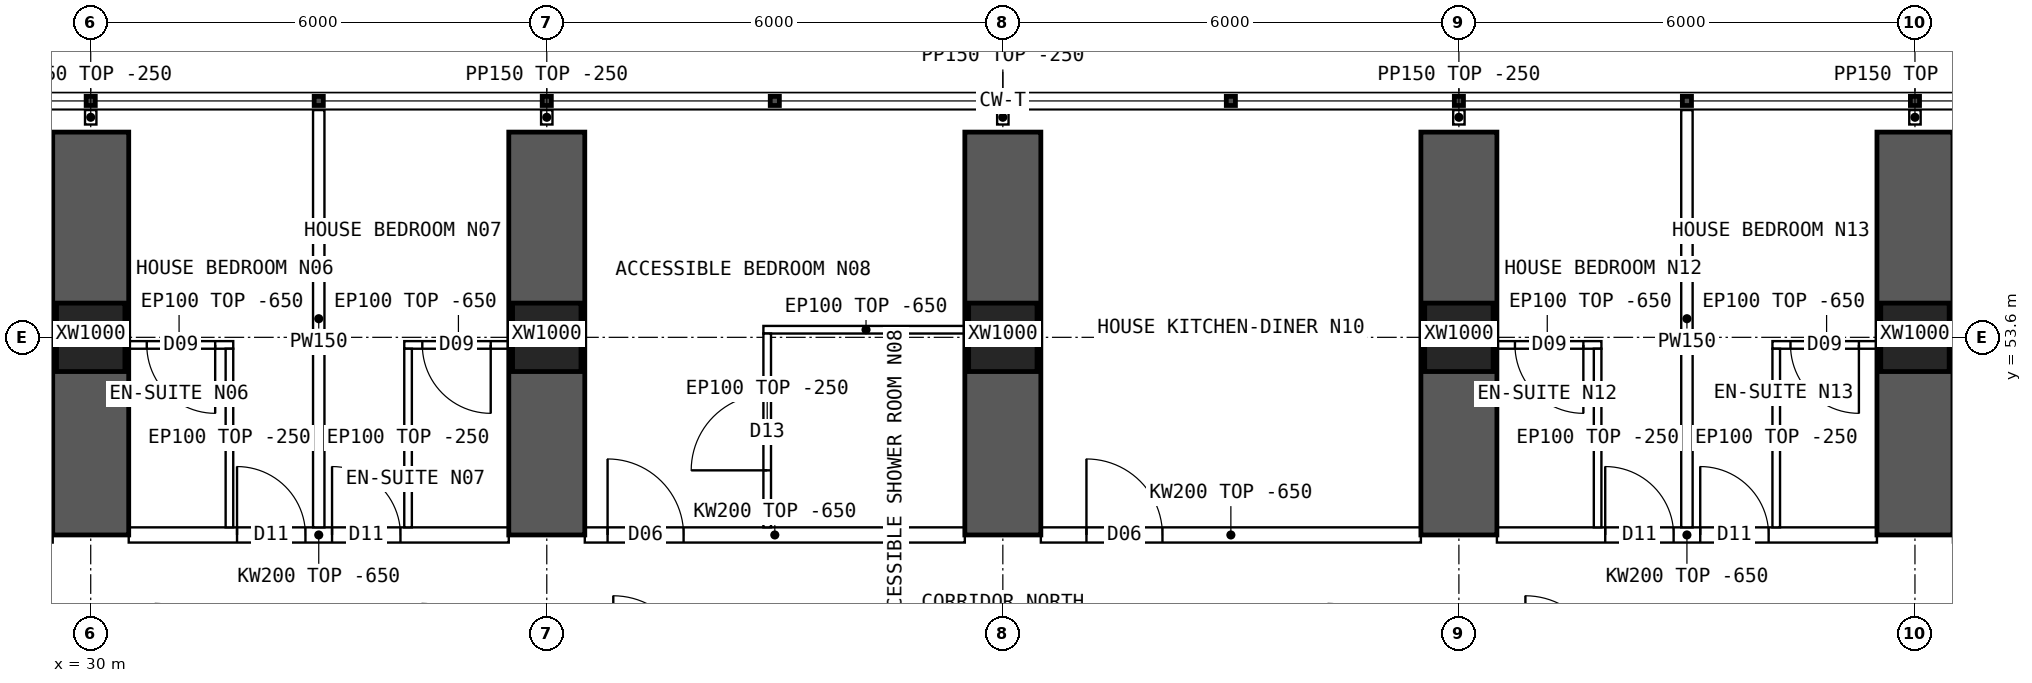
"""IFC4 building model, lengths in metres.
Left out: names, types, materials, properties, quantities, classifications, styles, units other than length and angle.
Written with IfcOpenShell. Run it as: python <this file> out.ifc"""

import sys

from ifc_helpers import new_model, si_unit, direction, frame, frame_2d, origin, origin_2d, place, context, subcontext, project, spatial, polyline, rectangle, hollow_rectangle, outline, extrude, element, fill, save


model = new_model("IFC4")
c1 = context("Model", 3, precision=1e-05, world=origin(), true_north=direction((0.0, 1.0)))
c2 = subcontext(c1, "Body", "Model", "MODEL_VIEW")
j1 = project(units=[si_unit("LENGTHUNIT", "METRE"), si_unit("PLANEANGLEUNIT", "RADIAN")], contexts=[c1])
p1 = place(None, origin())
s1 = spatial("IfcSite", under=j1, at=p1, CompositionType="ELEMENT")
p2 = place(p1, origin())
s2 = spatial("IfcBuilding", under=s1, at=p2, CompositionType="ELEMENT")
p3 = place(p2, frame((0.0, 0.0, 23.95)))
s3 = spatial("IfcBuildingStorey", under=s2, at=p3, CompositionType="ELEMENT", Elevation=23.95)
for number, where, z_axis, x_axis in (
    (1, (30.0, 53.6, 0.0), (0.0, 0.0, 1.0), (1.0, 0.0, 0.0)),
    (2, (36.0, 53.6, 0.0), (0.0, 0.0, 1.0), (1.0, 0.0, 0.0)),
    (3, (42.0, 53.6, 0.0), (0.0, 0.0, 1.0), (1.0, 0.0, 0.0)),
    (4, (48.0, 53.6, 0.0), (0.0, 0.0, 1.0), (1.0, 0.0, 0.0)),
    (5, (54.0, 53.6, 0.0), (0.0, 0.0, 1.0), (1.0, 0.0, 0.0)),
):
    element("IfcColumn", number, at=place(p3, frame(where, z_axis=z_axis, x_axis=x_axis)), inside=s3, PredefinedType="COLUMN", context=c2, shape_type="SweptSolid", body=[
        extrude(hollow_rectangle(XDim=0.9, YDim=0.9, WallThickness=0.09, at=origin_2d()), origin(), (0.0, 0.0, 1.0), 3.75),
    ])
for number, where, z_axis, x_axis in (
    (6, (30.0, 51.0, 0.0), (0.0, 0.0, 1.0), (0.0, 1.0, 0.0)),
    (7, (36.0, 51.0, 0.0), (0.0, 0.0, 1.0), (0.0, 1.0, 0.0)),
    (8, (42.0, 51.0, 0.0), (0.0, 0.0, 1.0), (0.0, 1.0, 0.0)),
    (9, (48.0, 51.0, 0.0), (0.0, 0.0, 1.0), (0.0, 1.0, 0.0)),
    (10, (54.0, 51.0, 0.0), (0.0, 0.0, 1.0), (0.0, 1.0, 0.0)),
):
    element("IfcWall", number, at=place(p3, frame(where, z_axis=z_axis, x_axis=x_axis)), inside=s3, PredefinedType="SHEAR", context=c2, shape_type="SweptSolid", body=[
        extrude(rectangle(XDim=5.3, YDim=1.0, at=frame_2d((2.65, 0.0))), origin(), (0.0, 0.0, 1.0), 3.75),
    ])
p4 = place(p3, frame((30.5, 51.0, 0.0), z_axis=(0.0, 0.0, 1.0), x_axis=(1.0, 0.0, 0.0)))
e11 = element("IfcWall", 11, at=p4, inside=s3, PredefinedType="SOLIDWALL", context=c2, shape_type="SweptSolid", body=[
    extrude(outline(polyline([(0.0, 0.0), (5.0, 0.0), (5.0, 3.1), (0.0, 3.1), (0.0, 0.0)])), frame((0.0, 0.1, 0.0), z_axis=(0.0, -1.0, 0.0), x_axis=(1.0, 0.0, 0.0)), (0.0, 0.0, 1.0), 0.2),
])
p5 = place(p4, frame((1.425, 0.0, 0.0)))
e12 = element("IfcOpeningElement", 12, at=p5, cuts=e11, PredefinedType="OPENING", context=c2, shape_type="SweptSolid", body=[
    extrude(rectangle(XDim=0.9, YDim=2.1, at=frame_2d((0.45, 1.05))), frame((0.0, 0.11, 0.0), z_axis=(0.0, -1.0, 0.0), x_axis=(1.0, 0.0, 0.0)), (0.0, 0.0, 1.0), 0.22),
])
p6 = place(p4, frame((2.675, 0.0, 0.0)))
e13 = element("IfcOpeningElement", 13, at=p6, cuts=e11, PredefinedType="OPENING", context=c2, shape_type="SweptSolid", body=[
    extrude(rectangle(XDim=0.9, YDim=2.1, at=frame_2d((0.45, 1.05))), frame((0.0, 0.11, 0.0), z_axis=(0.0, -1.0, 0.0), x_axis=(1.0, 0.0, 0.0)), (0.0, 0.0, 1.0), 0.22),
])
p7 = place(p3, frame((36.5, 51.0, 0.0), z_axis=(0.0, 0.0, 1.0), x_axis=(1.0, 0.0, 0.0)))
e14 = element("IfcWall", 14, at=p7, inside=s3, PredefinedType="SOLIDWALL", context=c2, shape_type="SweptSolid", body=[
    extrude(outline(polyline([(0.0, 0.0), (5.0, 0.0), (5.0, 3.1), (0.0, 3.1), (0.0, 0.0)])), frame((0.0, 0.1, 0.0), z_axis=(0.0, -1.0, 0.0), x_axis=(1.0, 0.0, 0.0)), (0.0, 0.0, 1.0), 0.2),
])
p8 = place(p7, frame((0.3, 0.0, 0.0)))
e15 = element("IfcOpeningElement", 15, at=p8, cuts=e14, PredefinedType="OPENING", context=c2, shape_type="SweptSolid", body=[
    extrude(rectangle(XDim=1.0, YDim=2.1, at=frame_2d((0.5, 1.05))), frame((0.0, 0.11, 0.0), z_axis=(0.0, -1.0, 0.0), x_axis=(1.0, 0.0, 0.0)), (0.0, 0.0, 1.0), 0.22),
])
p9 = place(p3, frame((42.5, 51.0, 0.0), z_axis=(0.0, 0.0, 1.0), x_axis=(1.0, 0.0, 0.0)))
e16 = element("IfcWall", 16, at=p9, inside=s3, PredefinedType="SOLIDWALL", context=c2, shape_type="SweptSolid", body=[
    extrude(outline(polyline([(0.0, 0.0), (5.0, 0.0), (5.0, 3.1), (0.0, 3.1), (0.0, 0.0)])), frame((0.0, 0.1, 0.0), z_axis=(0.0, -1.0, 0.0), x_axis=(1.0, 0.0, 0.0)), (0.0, 0.0, 1.0), 0.2),
])
p10 = place(p9, frame((0.6, 0.0, 0.0)))
e17 = element("IfcOpeningElement", 17, at=p10, cuts=e16, PredefinedType="OPENING", context=c2, shape_type="SweptSolid", body=[
    extrude(rectangle(XDim=1.0, YDim=2.1, at=frame_2d((0.5, 1.05))), frame((0.0, 0.11, 0.0), z_axis=(0.0, -1.0, 0.0), x_axis=(1.0, 0.0, 0.0)), (0.0, 0.0, 1.0), 0.22),
])
p11 = place(p3, frame((48.5, 51.0, 0.0), z_axis=(0.0, 0.0, 1.0), x_axis=(1.0, 0.0, 0.0)))
e18 = element("IfcWall", 18, at=p11, inside=s3, PredefinedType="SOLIDWALL", context=c2, shape_type="SweptSolid", body=[
    extrude(outline(polyline([(0.0, 0.0), (5.0, 0.0), (5.0, 3.1), (0.0, 3.1), (0.0, 0.0)])), frame((0.0, 0.1, 0.0), z_axis=(0.0, -1.0, 0.0), x_axis=(1.0, 0.0, 0.0)), (0.0, 0.0, 1.0), 0.2),
])
p12 = place(p11, frame((1.425, 0.0, 0.0)))
e19 = element("IfcOpeningElement", 19, at=p12, cuts=e18, PredefinedType="OPENING", context=c2, shape_type="SweptSolid", body=[
    extrude(rectangle(XDim=0.9, YDim=2.1, at=frame_2d((0.45, 1.05))), frame((0.0, 0.11, 0.0), z_axis=(0.0, -1.0, 0.0), x_axis=(1.0, 0.0, 0.0)), (0.0, 0.0, 1.0), 0.22),
])
p13 = place(p11, frame((2.675, 0.0, 0.0)))
e20 = element("IfcOpeningElement", 20, at=p13, cuts=e18, PredefinedType="OPENING", context=c2, shape_type="SweptSolid", body=[
    extrude(rectangle(XDim=0.9, YDim=2.1, at=frame_2d((0.45, 1.05))), frame((0.0, 0.11, 0.0), z_axis=(0.0, -1.0, 0.0), x_axis=(1.0, 0.0, 0.0)), (0.0, 0.0, 1.0), 0.22),
])
p14 = place(p3, frame((33.0, 56.59, 0.0), z_axis=(0.0, 0.0, 1.0), x_axis=(0.0, -1.0, 0.0)))
e21 = element("IfcWall", 21, at=p14, inside=s3, PredefinedType="PARTITIONING", context=c2, shape_type="SweptSolid", body=[
    extrude(outline(polyline([(0.0, 0.0), (5.49, 0.0), (5.49, 3.1), (5.442, 3.1), (5.44, 3.5), (3.192, 3.5), (3.19, 3.1), (2.792, 3.1), (2.79, 3.5), (0.0, 3.5), (0.0, 0.0)])), frame((0.0, 0.075, 0.0), z_axis=(0.0, -1.0, 0.0), x_axis=(1.0, 0.0, 0.0)), (0.0, 0.0, 1.0), 0.15),
])
p15 = place(p3, frame((30.45, 53.5, 0.0), z_axis=(0.0, 0.0, 1.0), x_axis=(1.0, 0.0, 0.0)))
e22 = element("IfcWall", 22, at=p15, inside=s3, PredefinedType="PARTITIONING", context=c2, shape_type="SweptSolid", body=[
    extrude(outline(polyline([(0.0, 0.0), (1.425, 0.0), (1.425, 3.1), (0.0, 3.1), (0.0, 0.0)])), frame((0.0, 0.05, 0.0), z_axis=(0.0, -1.0, 0.0), x_axis=(1.0, 0.0, 0.0)), (0.0, 0.0, 1.0), 0.1),
])
p16 = place(p15, frame((0.288, 0.0, 0.0)))
e23 = element("IfcOpeningElement", 23, at=p16, cuts=e22, PredefinedType="OPENING", context=c2, shape_type="SweptSolid", body=[
    extrude(rectangle(XDim=0.9, YDim=2.1, at=frame_2d((0.45, 1.05))), frame((0.0, 0.06, 0.0), z_axis=(0.0, -1.0, 0.0), x_axis=(1.0, 0.0, 0.0)), (0.0, 0.0, 1.0), 0.12),
])
p17 = place(p3, frame((31.825, 53.45, 0.0), z_axis=(0.0, 0.0, 1.0), x_axis=(0.0, -1.0, 0.0)))
e24 = element("IfcWall", 24, at=p17, inside=s3, PredefinedType="PARTITIONING", context=c2, shape_type="SweptSolid", body=[
    extrude(outline(polyline([(0.0, 0.0), (2.35, 0.0), (2.35, 3.1), (2.302, 3.1), (2.3, 3.5), (0.052, 3.5), (0.05, 3.1), (0.0, 3.1), (0.0, 0.0)])), frame((0.0, 0.05, 0.0), z_axis=(0.0, -1.0, 0.0), x_axis=(1.0, 0.0, 0.0)), (0.0, 0.0, 1.0), 0.1),
])
p18 = place(p3, frame((34.125, 53.5, 0.0), z_axis=(0.0, 0.0, 1.0), x_axis=(1.0, 0.0, 0.0)))
e25 = element("IfcWall", 25, at=p18, inside=s3, PredefinedType="PARTITIONING", context=c2, shape_type="SweptSolid", body=[
    extrude(outline(polyline([(0.0, 0.0), (1.425, 0.0), (1.425, 3.1), (0.0, 3.1), (0.0, 0.0)])), frame((0.0, 0.05, 0.0), z_axis=(0.0, -1.0, 0.0), x_axis=(1.0, 0.0, 0.0)), (0.0, 0.0, 1.0), 0.1),
])
p19 = place(p18, frame((0.238, 0.0, 0.0)))
e26 = element("IfcOpeningElement", 26, at=p19, cuts=e25, PredefinedType="OPENING", context=c2, shape_type="SweptSolid", body=[
    extrude(rectangle(XDim=0.9, YDim=2.1, at=frame_2d((0.45, 1.05))), frame((0.0, 0.06, 0.0), z_axis=(0.0, -1.0, 0.0), x_axis=(1.0, 0.0, 0.0)), (0.0, 0.0, 1.0), 0.12),
])
p20 = place(p3, frame((34.175, 53.45, 0.0), z_axis=(0.0, 0.0, 1.0), x_axis=(0.0, -1.0, 0.0)))
e27 = element("IfcWall", 27, at=p20, inside=s3, PredefinedType="PARTITIONING", context=c2, shape_type="SweptSolid", body=[
    extrude(outline(polyline([(0.0, 0.0), (2.35, 0.0), (2.35, 3.1), (2.302, 3.1), (2.3, 3.5), (0.052, 3.5), (0.05, 3.1), (0.0, 3.1), (0.0, 0.0)])), frame((0.0, 0.05, 0.0), z_axis=(0.0, -1.0, 0.0), x_axis=(1.0, 0.0, 0.0)), (0.0, 0.0, 1.0), 0.1),
])
p21 = place(p3, frame((38.85, 53.7, 0.0), z_axis=(0.0, 0.0, 1.0), x_axis=(1.0, 0.0, 0.0)))
e28 = element("IfcWall", 28, at=p21, inside=s3, PredefinedType="PARTITIONING", context=c2, shape_type="SweptSolid", body=[
    extrude(outline(polyline([(0.0, 0.0), (2.7, 0.0), (2.7, 3.1), (0.0, 3.1), (0.0, 0.0)])), frame((0.0, 0.05, 0.0), z_axis=(0.0, -1.0, 0.0), x_axis=(1.0, 0.0, 0.0)), (0.0, 0.0, 1.0), 0.1),
])
p22 = place(p3, frame((38.9, 53.65, 0.0), z_axis=(0.0, 0.0, 1.0), x_axis=(0.0, -1.0, 0.0)))
e29 = element("IfcWall", 29, at=p22, inside=s3, PredefinedType="PARTITIONING", context=c2, shape_type="SweptSolid", body=[
    extrude(outline(polyline([(0.0, 0.0), (2.55, 0.0), (2.55, 3.1), (2.502, 3.1), (2.5, 3.5), (0.252, 3.5), (0.25, 3.1), (0.0, 3.1), (0.0, 0.0)])), frame((0.0, 0.05, 0.0), z_axis=(0.0, -1.0, 0.0), x_axis=(1.0, 0.0, 0.0)), (0.0, 0.0, 1.0), 0.1),
])
p23 = place(p22, frame((0.8, 0.0, 0.0)))
e30 = element("IfcOpeningElement", 30, at=p23, cuts=e29, PredefinedType="OPENING", context=c2, shape_type="SweptSolid", body=[
    extrude(rectangle(XDim=1.0, YDim=2.1, at=frame_2d((0.5, 1.05))), frame((0.0, 0.06, 0.0), z_axis=(0.0, -1.0, 0.0), x_axis=(1.0, 0.0, 0.0)), (0.0, 0.0, 1.0), 0.12),
])
p24 = place(p3, frame((51.0, 56.59, 0.0), z_axis=(0.0, 0.0, 1.0), x_axis=(0.0, -1.0, 0.0)))
e31 = element("IfcWall", 31, at=p24, inside=s3, PredefinedType="PARTITIONING", context=c2, shape_type="SweptSolid", body=[
    extrude(outline(polyline([(0.0, 0.0), (5.49, 0.0), (5.49, 3.1), (5.442, 3.1), (5.44, 3.5), (3.192, 3.5), (3.19, 3.1), (2.792, 3.1), (2.79, 3.5), (0.0, 3.5), (0.0, 0.0)])), frame((0.0, 0.075, 0.0), z_axis=(0.0, -1.0, 0.0), x_axis=(1.0, 0.0, 0.0)), (0.0, 0.0, 1.0), 0.15),
])
p25 = place(p3, frame((48.45, 53.5, 0.0), z_axis=(0.0, 0.0, 1.0), x_axis=(1.0, 0.0, 0.0)))
e32 = element("IfcWall", 32, at=p25, inside=s3, PredefinedType="PARTITIONING", context=c2, shape_type="SweptSolid", body=[
    extrude(outline(polyline([(0.0, 0.0), (1.425, 0.0), (1.425, 3.1), (0.0, 3.1), (0.0, 0.0)])), frame((0.0, 0.05, 0.0), z_axis=(0.0, -1.0, 0.0), x_axis=(1.0, 0.0, 0.0)), (0.0, 0.0, 1.0), 0.1),
])
p26 = place(p25, frame((0.288, 0.0, 0.0)))
e33 = element("IfcOpeningElement", 33, at=p26, cuts=e32, PredefinedType="OPENING", context=c2, shape_type="SweptSolid", body=[
    extrude(rectangle(XDim=0.9, YDim=2.1, at=frame_2d((0.45, 1.05))), frame((0.0, 0.06, 0.0), z_axis=(0.0, -1.0, 0.0), x_axis=(1.0, 0.0, 0.0)), (0.0, 0.0, 1.0), 0.12),
])
p27 = place(p3, frame((49.825, 53.45, 0.0), z_axis=(0.0, 0.0, 1.0), x_axis=(0.0, -1.0, 0.0)))
e34 = element("IfcWall", 34, at=p27, inside=s3, PredefinedType="PARTITIONING", context=c2, shape_type="SweptSolid", body=[
    extrude(outline(polyline([(0.0, 0.0), (2.35, 0.0), (2.35, 3.1), (2.302, 3.1), (2.3, 3.5), (0.052, 3.5), (0.05, 3.1), (0.0, 3.1), (0.0, 0.0)])), frame((0.0, 0.05, 0.0), z_axis=(0.0, -1.0, 0.0), x_axis=(1.0, 0.0, 0.0)), (0.0, 0.0, 1.0), 0.1),
])
p28 = place(p3, frame((52.125, 53.5, 0.0), z_axis=(0.0, 0.0, 1.0), x_axis=(1.0, 0.0, 0.0)))
e35 = element("IfcWall", 35, at=p28, inside=s3, PredefinedType="PARTITIONING", context=c2, shape_type="SweptSolid", body=[
    extrude(outline(polyline([(0.0, 0.0), (1.425, 0.0), (1.425, 3.1), (0.0, 3.1), (0.0, 0.0)])), frame((0.0, 0.05, 0.0), z_axis=(0.0, -1.0, 0.0), x_axis=(1.0, 0.0, 0.0)), (0.0, 0.0, 1.0), 0.1),
])
p29 = place(p28, frame((0.238, 0.0, 0.0)))
e36 = element("IfcOpeningElement", 36, at=p29, cuts=e35, PredefinedType="OPENING", context=c2, shape_type="SweptSolid", body=[
    extrude(rectangle(XDim=0.9, YDim=2.1, at=frame_2d((0.45, 1.05))), frame((0.0, 0.06, 0.0), z_axis=(0.0, -1.0, 0.0), x_axis=(1.0, 0.0, 0.0)), (0.0, 0.0, 1.0), 0.12),
])
p30 = place(p3, frame((52.175, 53.45, 0.0), z_axis=(0.0, 0.0, 1.0), x_axis=(0.0, -1.0, 0.0)))
e37 = element("IfcWall", 37, at=p30, inside=s3, PredefinedType="PARTITIONING", context=c2, shape_type="SweptSolid", body=[
    extrude(outline(polyline([(0.0, 0.0), (2.35, 0.0), (2.35, 3.1), (2.302, 3.1), (2.3, 3.5), (0.052, 3.5), (0.05, 3.1), (0.0, 3.1), (0.0, 0.0)])), frame((0.0, 0.05, 0.0), z_axis=(0.0, -1.0, 0.0), x_axis=(1.0, 0.0, 0.0)), (0.0, 0.0, 1.0), 0.1),
])
for number, where, z_axis, x_axis in (
    (38, (30.0, 56.4, 0.0), (0.0, 0.0, 1.0), (0.0, 1.0, 0.0)),
    (39, (36.0, 56.4, 0.0), (0.0, 0.0, 1.0), (0.0, 1.0, 0.0)),
    (40, (42.0, 56.4, 0.0), (0.0, 0.0, 1.0), (0.0, 1.0, 0.0)),
    (41, (48.0, 56.4, 0.0), (0.0, 0.0, 1.0), (0.0, 1.0, 0.0)),
    (42, (54.0, 56.4, 0.0), (0.0, 0.0, 1.0), (0.0, 1.0, 0.0)),
):
    element("IfcWall", number, at=place(p3, frame(where, z_axis=z_axis, x_axis=x_axis)), inside=s3, PredefinedType="PARTITIONING", context=c2, shape_type="SweptSolid", body=[
        extrude(rectangle(XDim=0.19, YDim=0.15, at=frame_2d((0.095, 0.0))), origin(), (0.0, 0.0, 1.0), 3.5),
    ])
p31 = place(p16, origin())
e43 = element("IfcDoor", 43, at=p31, inside=s3, OperationType="SINGLE_SWING_RIGHT", PredefinedType="DOOR", context=c2, shape_type="SweptSolid", body=[
    extrude(rectangle(XDim=0.9, YDim=2.1, at=frame_2d((0.45, 1.05))), frame((0.0, 0.025, 0.0), z_axis=(0.0, -1.0, 0.0), x_axis=(1.0, 0.0, 0.0)), (0.0, 0.0, 1.0), 0.05),
])
fill(e23, e43)
p32 = place(p5, origin())
e44 = element("IfcDoor", 44, at=p32, inside=s3, OperationType="SINGLE_SWING_LEFT", PredefinedType="DOOR", context=c2, shape_type="SweptSolid", body=[
    extrude(rectangle(XDim=0.9, YDim=2.1, at=frame_2d((0.45, 1.05))), frame((0.0, 0.025, 0.0), z_axis=(0.0, -1.0, 0.0), x_axis=(1.0, 0.0, 0.0)), (0.0, 0.0, 1.0), 0.05),
])
fill(e12, e44)
p33 = place(p19, origin())
e45 = element("IfcDoor", 45, at=p33, inside=s3, OperationType="SINGLE_SWING_RIGHT", PredefinedType="DOOR", context=c2, shape_type="SweptSolid", body=[
    extrude(rectangle(XDim=0.9, YDim=2.1, at=frame_2d((0.45, 1.05))), frame((0.0, 0.025, 0.0), z_axis=(0.0, -1.0, 0.0), x_axis=(1.0, 0.0, 0.0)), (0.0, 0.0, 1.0), 0.05),
])
fill(e26, e45)
p34 = place(p6, origin())
e46 = element("IfcDoor", 46, at=p34, inside=s3, OperationType="SINGLE_SWING_LEFT", PredefinedType="DOOR", context=c2, shape_type="SweptSolid", body=[
    extrude(rectangle(XDim=0.9, YDim=2.1, at=frame_2d((0.45, 1.05))), frame((0.0, 0.025, 0.0), z_axis=(0.0, -1.0, 0.0), x_axis=(1.0, 0.0, 0.0)), (0.0, 0.0, 1.0), 0.05),
])
fill(e13, e46)
p35 = place(p23, origin())
e47 = element("IfcDoor", 47, at=p35, inside=s3, OperationType="SINGLE_SWING_RIGHT", PredefinedType="DOOR", context=c2, shape_type="SweptSolid", body=[
    extrude(rectangle(XDim=1.0, YDim=2.1, at=frame_2d((0.5, 1.05))), frame((0.0, 0.025, 0.0), z_axis=(0.0, -1.0, 0.0), x_axis=(1.0, 0.0, 0.0)), (0.0, 0.0, 1.0), 0.05),
])
fill(e30, e47)
p36 = place(p8, origin())
e48 = element("IfcDoor", 48, at=p36, inside=s3, OperationType="SINGLE_SWING_LEFT", PredefinedType="DOOR", context=c2, shape_type="SweptSolid", body=[
    extrude(rectangle(XDim=1.0, YDim=2.1, at=frame_2d((0.5, 1.05))), frame((0.0, 0.025, 0.0), z_axis=(0.0, -1.0, 0.0), x_axis=(1.0, 0.0, 0.0)), (0.0, 0.0, 1.0), 0.05),
])
fill(e15, e48)
p37 = place(p10, origin())
e49 = element("IfcDoor", 49, at=p37, inside=s3, OperationType="SINGLE_SWING_LEFT", PredefinedType="DOOR", context=c2, shape_type="SweptSolid", body=[
    extrude(rectangle(XDim=1.0, YDim=2.1, at=frame_2d((0.5, 1.05))), frame((0.0, 0.025, 0.0), z_axis=(0.0, -1.0, 0.0), x_axis=(1.0, 0.0, 0.0)), (0.0, 0.0, 1.0), 0.05),
])
fill(e17, e49)
p38 = place(p26, origin())
e50 = element("IfcDoor", 50, at=p38, inside=s3, OperationType="SINGLE_SWING_RIGHT", PredefinedType="DOOR", context=c2, shape_type="SweptSolid", body=[
    extrude(rectangle(XDim=0.9, YDim=2.1, at=frame_2d((0.45, 1.05))), frame((0.0, 0.025, 0.0), z_axis=(0.0, -1.0, 0.0), x_axis=(1.0, 0.0, 0.0)), (0.0, 0.0, 1.0), 0.05),
])
fill(e33, e50)
p39 = place(p12, origin())
e51 = element("IfcDoor", 51, at=p39, inside=s3, OperationType="SINGLE_SWING_LEFT", PredefinedType="DOOR", context=c2, shape_type="SweptSolid", body=[
    extrude(rectangle(XDim=0.9, YDim=2.1, at=frame_2d((0.45, 1.05))), frame((0.0, 0.025, 0.0), z_axis=(0.0, -1.0, 0.0), x_axis=(1.0, 0.0, 0.0)), (0.0, 0.0, 1.0), 0.05),
])
fill(e19, e51)
p40 = place(p29, origin())
e52 = element("IfcDoor", 52, at=p40, inside=s3, OperationType="SINGLE_SWING_RIGHT", PredefinedType="DOOR", context=c2, shape_type="SweptSolid", body=[
    extrude(rectangle(XDim=0.9, YDim=2.1, at=frame_2d((0.45, 1.05))), frame((0.0, 0.025, 0.0), z_axis=(0.0, -1.0, 0.0), x_axis=(1.0, 0.0, 0.0)), (0.0, 0.0, 1.0), 0.05),
])
fill(e36, e52)
p41 = place(p13, origin())
e53 = element("IfcDoor", 53, at=p41, inside=s3, OperationType="SINGLE_SWING_LEFT", PredefinedType="DOOR", context=c2, shape_type="SweptSolid", body=[
    extrude(rectangle(XDim=0.9, YDim=2.1, at=frame_2d((0.45, 1.05))), frame((0.0, 0.025, 0.0), z_axis=(0.0, -1.0, 0.0), x_axis=(1.0, 0.0, 0.0)), (0.0, 0.0, 1.0), 0.05),
])
fill(e20, e53)
save(model, sys.argv[1])
